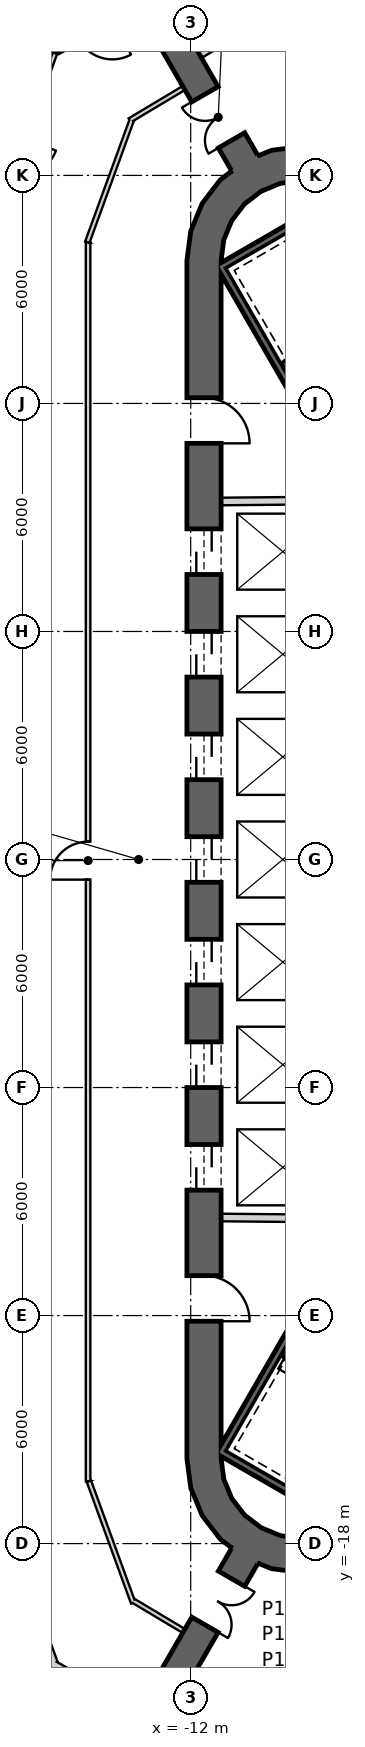
"""IFC4 building model, lengths in metres.
Left out: names, types, materials, properties, quantities, classifications, styles, units other than length and angle.
Written with IfcOpenShell. Run it as: python <this file> out.ifc"""

import sys

from ifc_helpers import new_model, si_unit, direction, frame, frame_2d, origin, place, context, subcontext, project, spatial, polyline, rectangle, outline, extrude, element, fill, save


model = new_model("IFC4")
c1 = context("Model", 3, precision=1e-05, world=origin(), true_north=direction((0.0, 1.0)))
c2 = subcontext(c1, "Body", "Model", "MODEL_VIEW")
j1 = project(units=[si_unit("LENGTHUNIT", "METRE"), si_unit("PLANEANGLEUNIT", "RADIAN")], contexts=[c1])
p1 = place(None, origin())
s1 = spatial("IfcSite", under=j1, at=p1, CompositionType="ELEMENT")
p2 = place(p1, origin())
s2 = spatial("IfcBuilding", under=s1, at=p2, CompositionType="ELEMENT")
p3 = place(p2, frame((0.0, 0.0, 82.4)))
s3 = spatial("IfcBuildingStorey", under=s2, at=p3, CompositionType="ELEMENT", Elevation=82.4)
p4 = place(p3, frame((-11.65, 15.762, 0.0), z_axis=(0.0, 0.0, 1.0), x_axis=(0.0, -1.0, 0.0)))
e1 = element("IfcWall", 1, at=p4, inside=s3, PredefinedType="SHEAR", context=c2, shape_type="SweptSolid", body=[
    extrude(rectangle(XDim=31.523, YDim=0.9, at=frame_2d((15.762, 0.0))), origin(), (0.0, 0.0, 1.0), 4.1),
])
p5 = place(p4, frame((7.062, 0.0, 0.0)))
e2 = element("IfcOpeningElement", 2, at=p5, cuts=e1, PredefinedType="OPENING", context=c2, shape_type="SweptSolid", body=[
    extrude(rectangle(XDim=1.2, YDim=2.4, at=frame_2d((0.6, 1.2))), frame((0.0, 0.46, 0.0), z_axis=(0.0, -1.0, 0.0), x_axis=(1.0, 0.0, 0.0)), (0.0, 0.0, 1.0), 0.92),
])
p6 = place(p4, frame((9.762, 0.0, 0.0)))
e3 = element("IfcOpeningElement", 3, at=p6, cuts=e1, PredefinedType="OPENING", context=c2, shape_type="SweptSolid", body=[
    extrude(rectangle(XDim=1.2, YDim=2.4, at=frame_2d((0.6, 1.2))), frame((0.0, 0.46, 0.0), z_axis=(0.0, -1.0, 0.0), x_axis=(1.0, 0.0, 0.0)), (0.0, 0.0, 1.0), 0.92),
])
p7 = place(p4, frame((12.462, 0.0, 0.0)))
e4 = element("IfcOpeningElement", 4, at=p7, cuts=e1, PredefinedType="OPENING", context=c2, shape_type="SweptSolid", body=[
    extrude(rectangle(XDim=1.2, YDim=2.4, at=frame_2d((0.6, 1.2))), frame((0.0, 0.46, 0.0), z_axis=(0.0, -1.0, 0.0), x_axis=(1.0, 0.0, 0.0)), (0.0, 0.0, 1.0), 0.92),
])
p8 = place(p4, frame((15.162, 0.0, 0.0)))
e5 = element("IfcOpeningElement", 5, at=p8, cuts=e1, PredefinedType="OPENING", context=c2, shape_type="SweptSolid", body=[
    extrude(rectangle(XDim=1.2, YDim=2.4, at=frame_2d((0.6, 1.2))), frame((0.0, 0.46, 0.0), z_axis=(0.0, -1.0, 0.0), x_axis=(1.0, 0.0, 0.0)), (0.0, 0.0, 1.0), 0.92),
])
p9 = place(p4, frame((17.862, 0.0, 0.0)))
e6 = element("IfcOpeningElement", 6, at=p9, cuts=e1, PredefinedType="OPENING", context=c2, shape_type="SweptSolid", body=[
    extrude(rectangle(XDim=1.2, YDim=2.4, at=frame_2d((0.6, 1.2))), frame((0.0, 0.46, 0.0), z_axis=(0.0, -1.0, 0.0), x_axis=(1.0, 0.0, 0.0)), (0.0, 0.0, 1.0), 0.92),
])
p10 = place(p4, frame((20.562, 0.0, 0.0)))
e7 = element("IfcOpeningElement", 7, at=p10, cuts=e1, PredefinedType="OPENING", context=c2, shape_type="SweptSolid", body=[
    extrude(rectangle(XDim=1.2, YDim=2.4, at=frame_2d((0.6, 1.2))), frame((0.0, 0.46, 0.0), z_axis=(0.0, -1.0, 0.0), x_axis=(1.0, 0.0, 0.0)), (0.0, 0.0, 1.0), 0.92),
])
p11 = place(p4, frame((23.262, 0.0, 0.0)))
e8 = element("IfcOpeningElement", 8, at=p11, cuts=e1, PredefinedType="OPENING", context=c2, shape_type="SweptSolid", body=[
    extrude(rectangle(XDim=1.2, YDim=2.4, at=frame_2d((0.6, 1.2))), frame((0.0, 0.46, 0.0), z_axis=(0.0, -1.0, 0.0), x_axis=(1.0, 0.0, 0.0)), (0.0, 0.0, 1.0), 0.92),
])
p12 = place(p4, frame((3.612, 0.0, 0.0)))
e9 = element("IfcOpeningElement", 9, at=p12, cuts=e1, PredefinedType="OPENING", context=c2, shape_type="SweptSolid", body=[
    extrude(rectangle(XDim=1.2, YDim=2.4, at=frame_2d((0.6, 1.2))), frame((0.0, 0.46, 0.0), z_axis=(0.0, -1.0, 0.0), x_axis=(1.0, 0.0, 0.0)), (0.0, 0.0, 1.0), 0.92),
])
p13 = place(p4, frame((26.712, 0.0, 0.0)))
e10 = element("IfcOpeningElement", 10, at=p13, cuts=e1, PredefinedType="OPENING", context=c2, shape_type="SweptSolid", body=[
    extrude(rectangle(XDim=1.2, YDim=2.4, at=frame_2d((0.6, 1.2))), frame((0.0, 0.46, 0.0), z_axis=(0.0, -1.0, 0.0), x_axis=(1.0, 0.0, 0.0)), (0.0, 0.0, 1.0), 0.92),
])
p14 = place(p3, origin())
e11 = element("IfcWall", 11, at=p14, inside=s3, PredefinedType="SHEAR", context=c2, shape_type="SweptSolid", body=[
    extrude(outline(polyline([(-7.6, 18.36), (-8.323, 18.659), (-9.1, 18.762), (-9.876, 18.659), (-10.6, 18.36), (-11.221, 17.883), (-11.698, 17.262), (-11.998, 16.538), (-12.1, 15.762), (-11.2, 15.762), (-11.128, 16.305), (-10.919, 16.812), (-10.585, 17.247), (-10.15, 17.58), (-9.644, 17.79), (-9.1, 17.862), (-8.556, 17.79), (-8.05, 17.58), (-7.6, 18.36)])), origin(), (0.0, 0.0, 1.0), 4.1),
])
p15 = place(p3, origin())
e12 = element("IfcWall", 12, at=p15, inside=s3, PredefinedType="SHEAR", context=c2, shape_type="SweptSolid", body=[
    extrude(outline(polyline([(-12.1, -15.762), (-11.998, -16.538), (-11.698, -17.262), (-11.221, -17.883), (-10.6, -18.36), (-9.876, -18.659), (-9.1, -18.762), (-8.323, -18.659), (-7.6, -18.36), (-8.05, -17.58), (-8.556, -17.79), (-9.1, -17.862), (-9.644, -17.79), (-10.15, -17.58), (-10.585, -17.247), (-10.919, -16.812), (-11.128, -16.305), (-11.2, -15.762), (-12.1, -15.762)])), origin(), (0.0, 0.0, 1.0), 4.1),
])
p16 = place(p3, frame((-10.575, 18.316, 0.0), z_axis=(0.0, 0.0, 1.0), x_axis=(-0.499995223427, 0.866028161523, 0.0)))
e13 = element("IfcWall", 13, at=p16, inside=s3, PredefinedType="SHEAR", context=c2, shape_type="SweptSolid", body=[
    extrude(rectangle(XDim=13.455, YDim=0.8, at=frame_2d((6.728, 0.0))), origin(), (0.0, 0.0, 1.0), 4.1),
])
p17 = place(p16, frame((0.7, 0.0, 0.0)))
e14 = element("IfcOpeningElement", 14, at=p17, cuts=e13, PredefinedType="OPENING", context=c2, shape_type="SweptSolid", body=[
    extrude(rectangle(XDim=1.4, YDim=2.4, at=frame_2d((0.7, 1.2))), frame((0.0, 0.41, 0.0), z_axis=(0.0, -1.0, 0.0), x_axis=(1.0, 0.0, 0.0)), (0.0, 0.0, 1.0), 0.82),
])
p18 = place(p3, frame((-10.575, -18.316, 0.0), z_axis=(0.0, 0.0, 1.0), x_axis=(-0.499995223427, -0.866028161523, 0.0)))
e15 = element("IfcWall", 15, at=p18, inside=s3, PredefinedType="SHEAR", context=c2, shape_type="SweptSolid", body=[
    extrude(rectangle(XDim=13.455, YDim=0.8, at=frame_2d((6.728, 0.0))), origin(), (0.0, 0.0, 1.0), 4.1),
])
p19 = place(p18, frame((0.7, 0.0, 0.0)))
e16 = element("IfcOpeningElement", 16, at=p19, cuts=e15, PredefinedType="OPENING", context=c2, shape_type="SweptSolid", body=[
    extrude(rectangle(XDim=1.4, YDim=2.4, at=frame_2d((0.7, 1.2))), frame((0.0, 0.41, 0.0), z_axis=(0.0, -1.0, 0.0), x_axis=(1.0, 0.0, 0.0)), (0.0, 0.0, 1.0), 0.82),
])
p20 = place(p3, frame((-11.2, 9.42, 0.0), z_axis=(0.0, 0.0, 1.0), x_axis=(0.999957167047, 0.009255488683, 0.0)))
e17 = element("IfcWall", 17, at=p20, inside=s3, PredefinedType="PLUMBINGWALL", context=c2, shape_type="SweptSolid", body=[
    extrude(rectangle(XDim=3.35, YDim=0.2, at=frame_2d((1.675, 0.0))), origin(), (0.0, 0.0, 1.0), 3.8),
])
p21 = place(p3, frame((-8.05, -9.449, 0.0), z_axis=(0.0, 0.0, 1.0), x_axis=(-0.999957467379, 0.009222983926, 0.0)))
e18 = element("IfcWall", 18, at=p21, inside=s3, PredefinedType="PLUMBINGWALL", context=c2, shape_type="SweptSolid", body=[
    extrude(rectangle(XDim=3.15, YDim=0.2, at=frame_2d((1.575, 0.0))), origin(), (0.0, 0.0, 1.0), 3.8),
])
p22 = place(p3, frame((-11.245, 15.678, -0.3), z_axis=(0.0, 0.0, 1.0), x_axis=(0.499977274689, -0.866038523851, 0.0)))
e19 = element("IfcWall", 19, at=p22, inside=s3, PredefinedType="SHEAR", context=c2, shape_type="SweptSolid", body=[
    extrude(rectangle(XDim=8.1, YDim=0.2, at=frame_2d((4.05, 0.0))), origin(), (0.0, 0.0, 1.0), 4.1),
])
for number, where, z_axis, x_axis in (
    (20, (-7.818, 17.541, -0.3), (0.0, 0.0, 1.0), (-0.866, -0.5, 0.0)),
    (21, (-11.282, -15.541, -0.3), (0.0, 0.0, 1.0), (0.866, -0.5, 0.0)),
):
    element("IfcWall", number, at=place(p3, frame(where, z_axis=z_axis, x_axis=x_axis)), inside=s3, PredefinedType="SHEAR", context=c2, shape_type="SweptSolid", body=[
        extrude(rectangle(XDim=3.8, YDim=0.2, at=frame_2d((1.9, 0.0))), origin(), (0.0, 0.0, 1.0), 4.1),
    ])
p23 = place(p3, frame((-7.196, -8.663, -0.3), z_axis=(0.0, 0.0, 1.0), x_axis=(-0.499997992926, -0.866026562566, 0.0)))
e22 = element("IfcWall", 22, at=p23, inside=s3, PredefinedType="SHEAR", context=c2, shape_type="SweptSolid", body=[
    extrude(rectangle(XDim=7.9, YDim=0.2, at=frame_2d((3.95, 0.0))), origin(), (0.0, 0.0, 1.0), 4.1),
])
p24 = place(p3, frame((-12.181, 20.299, 0.0), z_axis=(0.0, 0.0, 1.0), x_axis=(-0.8583241935, -0.51310776534, 0.0)))
e23 = element("IfcWall", 23, at=p24, inside=s3, PredefinedType="PARTITIONING", context=c2, shape_type="SweptSolid", body=[
    extrude(rectangle(XDim=1.656, YDim=0.12, at=frame_2d((0.828, 0.0))), origin(), (0.0, 0.0, 1.0), 3.8),
])
p25 = place(p3, frame((-13.549, 19.461, 0.0), z_axis=(0.0, 0.0, 1.0), x_axis=(-0.341989191955, -0.939703885586, 0.0)))
e24 = element("IfcWall", 24, at=p25, inside=s3, PredefinedType="PARTITIONING", context=c2, shape_type="SweptSolid", body=[
    extrude(rectangle(XDim=3.425, YDim=0.12, at=frame_2d((1.712, 0.0))), origin(), (0.0, 0.0, 1.0), 2.88),
])
p26 = place(p3, frame((-14.7, -16.359, 0.0), z_axis=(0.0, 0.0, 1.0), x_axis=(0.0, 1.0, 0.0)))
e25 = element("IfcWall", 25, at=p26, inside=s3, PredefinedType="PARTITIONING", context=c2, shape_type="SweptSolid", body=[
    extrude(rectangle(XDim=32.599, YDim=0.12, at=frame_2d((16.299, 0.0))), origin(), (0.0, 0.0, 1.0), 2.98),
])
p27 = place(p26, frame((15.83, 0.0, 0.0)))
e26 = element("IfcOpeningElement", 26, at=p27, cuts=e25, PredefinedType="OPENING", context=c2, shape_type="SweptSolid", body=[
    extrude(rectangle(XDim=1.0, YDim=2.1, at=frame_2d((0.5, 1.05))), frame((0.0, 0.07, 0.0), z_axis=(0.0, -1.0, 0.0), x_axis=(1.0, 0.0, 0.0)), (0.0, 0.0, 1.0), 0.14),
])
p28 = place(p3, frame((-14.679, -16.356, 0.0), z_axis=(0.0, 0.0, 1.0), x_axis=(0.342002052592, -0.939699205077, 0.0)))
e27 = element("IfcWall", 27, at=p28, inside=s3, PredefinedType="PARTITIONING", context=c2, shape_type="SweptSolid", body=[
    extrude(rectangle(XDim=3.406, YDim=0.12, at=frame_2d((1.703, 0.0))), origin(), (0.0, 0.0, 1.0), 2.88),
])
p29 = place(p3, frame((-13.516, -19.501, 0.0), z_axis=(0.0, 0.0, 1.0), x_axis=(0.858336816023, -0.513086649856, 0.0)))
e28 = element("IfcWall", 28, at=p29, inside=s3, PredefinedType="PARTITIONING", context=c2, shape_type="SweptSolid", body=[
    extrude(rectangle(XDim=1.555, YDim=0.12, at=frame_2d((0.777, 0.0))), origin(), (0.0, 0.0, 1.0), 3.8),
])
p30 = place(p3, frame((-15.679, -21.14, 0.0), z_axis=(0.0, 0.0, 1.0), x_axis=(0.871170402172, -0.490980784124, 0.0)))
e29 = element("IfcWall", 29, at=p30, inside=s3, PredefinedType="PARTITIONING", context=c2, shape_type="SweptSolid", body=[
    extrude(rectangle(XDim=2.609, YDim=0.2, at=frame_2d((1.305, 0.0))), origin(), (0.0, 0.0, 1.0), 3.8),
])
p31 = place(p3, frame((-17.234, -16.646, 0.0), z_axis=(0.0, 0.0, 1.0), x_axis=(0.342004731639, -0.939698230038, 0.0)))
e30 = element("IfcWall", 30, at=p31, inside=s3, PredefinedType="PARTITIONING", context=c2, shape_type="SweptSolid", body=[
    extrude(rectangle(XDim=4.794, YDim=0.2, at=frame_2d((2.397, 0.0))), origin(), (0.0, 0.0, 1.0), 2.88),
])
p32 = place(p3, frame((-15.57, 21.218, 0.0), z_axis=(0.0, 0.0, 1.0), x_axis=(-0.342015355476, -0.939694363407, 0.0)))
e31 = element("IfcWall", 31, at=p32, inside=s3, PredefinedType="PARTITIONING", context=c2, shape_type="SweptSolid", body=[
    extrude(rectangle(XDim=0.936, YDim=0.12, at=frame_2d((0.468, 0.0))), origin(), (0.0, 0.0, 1.0), 2.88),
])
p33 = place(p3, frame((-13.406, 22.421, 0.0), z_axis=(0.0, 0.0, 1.0), x_axis=(-0.87117593963, -0.490970958622, 0.0)))
e32 = element("IfcWall", 32, at=p33, inside=s3, PredefinedType="PARTITIONING", context=c2, shape_type="SweptSolid", body=[
    extrude(rectangle(XDim=2.4, YDim=0.12, at=frame_2d((1.2, 0.0))), origin(), (0.0, 0.0, 1.0), 3.8),
])
p34 = place(p33, frame((0.75, 0.0, 0.0)))
e33 = element("IfcOpeningElement", 33, at=p34, cuts=e32, PredefinedType="OPENING", context=c2, shape_type="SweptSolid", body=[
    extrude(rectangle(XDim=1.0, YDim=2.1, at=frame_2d((0.5, 1.05))), frame((0.0, 0.07, 0.0), z_axis=(0.0, -1.0, 0.0), x_axis=(1.0, 0.0, 0.0)), (0.0, 0.0, 1.0), 0.14),
])
p35 = place(p3, frame((-10.118, 22.157, 0.0), z_axis=(0.0, 0.0, 1.0), x_axis=(-0.859118225537, -0.511777172752, 0.0)))
e34 = element("IfcWall", 34, at=p35, inside=s3, PredefinedType="PARTITIONING", context=c2, shape_type="SweptSolid", body=[
    extrude(rectangle(XDim=1.917, YDim=0.2, at=frame_2d((0.958, 0.0))), origin(), (0.0, 0.0, 1.0), 3.8),
])
p36 = place(p27, origin())
e35 = element("IfcDoor", 35, at=p36, inside=s3, OperationType="SINGLE_SWING_RIGHT", PredefinedType="NOTDEFINED", context=c2, shape_type="SweptSolid", body=[
    extrude(rectangle(XDim=1.0, YDim=2.1, at=frame_2d((0.5, 1.05))), frame((0.0, 0.025, 0.0), z_axis=(0.0, -1.0, 0.0), x_axis=(1.0, 0.0, 0.0)), (0.0, 0.0, 1.0), 0.05),
])
fill(e26, e35)
p37 = place(p5, origin())
e36 = element("IfcDoor", 36, at=p37, inside=s3, OperationType="SLIDING_TO_LEFT", PredefinedType="USERDEFINED", context=c2, shape_type="SweptSolid", body=[
    extrude(rectangle(XDim=1.2, YDim=2.4, at=frame_2d((0.6, 1.2))), frame((0.0, 0.025, 0.0), z_axis=(0.0, -1.0, 0.0), x_axis=(1.0, 0.0, 0.0)), (0.0, 0.0, 1.0), 0.05),
])
fill(e2, e36)
p38 = place(p6, origin())
e37 = element("IfcDoor", 37, at=p38, inside=s3, OperationType="SLIDING_TO_LEFT", PredefinedType="USERDEFINED", context=c2, shape_type="SweptSolid", body=[
    extrude(rectangle(XDim=1.2, YDim=2.4, at=frame_2d((0.6, 1.2))), frame((0.0, 0.025, 0.0), z_axis=(0.0, -1.0, 0.0), x_axis=(1.0, 0.0, 0.0)), (0.0, 0.0, 1.0), 0.05),
])
fill(e3, e37)
p39 = place(p7, origin())
e38 = element("IfcDoor", 38, at=p39, inside=s3, OperationType="SLIDING_TO_LEFT", PredefinedType="USERDEFINED", context=c2, shape_type="SweptSolid", body=[
    extrude(rectangle(XDim=1.2, YDim=2.4, at=frame_2d((0.6, 1.2))), frame((0.0, 0.025, 0.0), z_axis=(0.0, -1.0, 0.0), x_axis=(1.0, 0.0, 0.0)), (0.0, 0.0, 1.0), 0.05),
])
fill(e4, e38)
p40 = place(p8, origin())
e39 = element("IfcDoor", 39, at=p40, inside=s3, OperationType="SLIDING_TO_LEFT", PredefinedType="USERDEFINED", context=c2, shape_type="SweptSolid", body=[
    extrude(rectangle(XDim=1.2, YDim=2.4, at=frame_2d((0.6, 1.2))), frame((0.0, 0.025, 0.0), z_axis=(0.0, -1.0, 0.0), x_axis=(1.0, 0.0, 0.0)), (0.0, 0.0, 1.0), 0.05),
])
fill(e5, e39)
p41 = place(p9, origin())
e40 = element("IfcDoor", 40, at=p41, inside=s3, OperationType="SLIDING_TO_LEFT", PredefinedType="USERDEFINED", context=c2, shape_type="SweptSolid", body=[
    extrude(rectangle(XDim=1.2, YDim=2.4, at=frame_2d((0.6, 1.2))), frame((0.0, 0.025, 0.0), z_axis=(0.0, -1.0, 0.0), x_axis=(1.0, 0.0, 0.0)), (0.0, 0.0, 1.0), 0.05),
])
fill(e6, e40)
p42 = place(p10, origin())
e41 = element("IfcDoor", 41, at=p42, inside=s3, OperationType="SLIDING_TO_LEFT", PredefinedType="USERDEFINED", context=c2, shape_type="SweptSolid", body=[
    extrude(rectangle(XDim=1.2, YDim=2.4, at=frame_2d((0.6, 1.2))), frame((0.0, 0.025, 0.0), z_axis=(0.0, -1.0, 0.0), x_axis=(1.0, 0.0, 0.0)), (0.0, 0.0, 1.0), 0.05),
])
fill(e7, e41)
p43 = place(p11, origin())
e42 = element("IfcDoor", 42, at=p43, inside=s3, OperationType="SLIDING_TO_LEFT", PredefinedType="USERDEFINED", context=c2, shape_type="SweptSolid", body=[
    extrude(rectangle(XDim=1.2, YDim=2.4, at=frame_2d((0.6, 1.2))), frame((0.0, 0.025, 0.0), z_axis=(0.0, -1.0, 0.0), x_axis=(1.0, 0.0, 0.0)), (0.0, 0.0, 1.0), 0.05),
])
fill(e8, e42)
p44 = place(p12, origin())
e43 = element("IfcDoor", 43, at=p44, inside=s3, OperationType="SINGLE_SWING_LEFT", PredefinedType="USERDEFINED", context=c2, shape_type="SweptSolid", body=[
    extrude(rectangle(XDim=1.2, YDim=2.4, at=frame_2d((0.6, 1.2))), frame((0.0, 0.025, 0.0), z_axis=(0.0, -1.0, 0.0), x_axis=(1.0, 0.0, 0.0)), (0.0, 0.0, 1.0), 0.05),
])
fill(e9, e43)
p45 = place(p13, origin())
e44 = element("IfcDoor", 44, at=p45, inside=s3, OperationType="SINGLE_SWING_RIGHT", PredefinedType="USERDEFINED", context=c2, shape_type="SweptSolid", body=[
    extrude(rectangle(XDim=1.2, YDim=2.4, at=frame_2d((0.6, 1.2))), frame((0.0, 0.025, 0.0), z_axis=(0.0, -1.0, 0.0), x_axis=(1.0, 0.0, 0.0)), (0.0, 0.0, 1.0), 0.05),
])
fill(e10, e44)
p46 = place(p17, origin())
e45 = element("IfcDoor", 45, at=p46, inside=s3, OperationType="DOUBLE_DOOR_SINGLE_SWING", PredefinedType="NOTDEFINED", context=c2, shape_type="SweptSolid", body=[
    extrude(rectangle(XDim=1.4, YDim=2.4, at=frame_2d((0.7, 1.2))), frame((0.0, 0.025, 0.0), z_axis=(0.0, -1.0, 0.0), x_axis=(1.0, 0.0, 0.0)), (0.0, 0.0, 1.0), 0.05),
])
fill(e14, e45)
p47 = place(p19, origin())
e46 = element("IfcDoor", 46, at=p47, inside=s3, OperationType="DOUBLE_DOOR_SINGLE_SWING", PredefinedType="NOTDEFINED", context=c2, shape_type="SweptSolid", body=[
    extrude(rectangle(XDim=1.4, YDim=2.4, at=frame_2d((0.7, 1.2))), frame((0.0, 0.025, 0.0), z_axis=(0.0, -1.0, 0.0), x_axis=(1.0, 0.0, 0.0)), (0.0, 0.0, 1.0), 0.05),
])
fill(e16, e46)
save(model, sys.argv[1])
